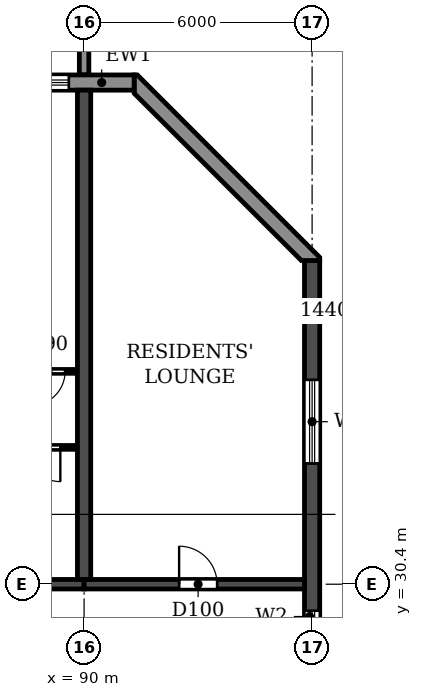
"""IFC4 building model, lengths in metres.
Left out: names, types, materials, properties, quantities, classifications, styles, units other than length and angle.
Written with IfcOpenShell. Run it as: python <this file> out.ifc"""

import sys

from ifc_helpers import new_model, si_unit, direction, frame, frame_2d, origin, place, context, subcontext, project, spatial, polyline, rectangle, outline, extrude, source, transform, mapped, element, fill, save


model = new_model("IFC4")
c1 = context("Model", 3, precision=1e-05, world=origin(), true_north=direction((0.0, 1.0)))
c2 = subcontext(c1, "Body", "Model", "MODEL_VIEW")
j1 = project(units=[si_unit("LENGTHUNIT", "METRE"), si_unit("PLANEANGLEUNIT", "RADIAN")], contexts=[c1])
p1 = place(None, origin())
s1 = spatial("IfcSite", under=j1, at=p1, CompositionType="ELEMENT")
p2 = place(p1, origin())
s2 = spatial("IfcBuilding", under=s1, at=p2, CompositionType="ELEMENT")
p3 = place(p2, frame((0.0, 0.0, 82.8)))
s3 = spatial("IfcBuildingStorey", under=s2, at=p3, CompositionType="ELEMENT", Elevation=82.8)
p4 = place(p3, frame((90.0, 30.525, 0.0), z_axis=(0.0, 0.0, 1.0), x_axis=(0.0, 1.0, 0.0)))
e1 = element("IfcWall", 1, at=p4, inside=s3, PredefinedType="SHEAR", context=c2, shape_type="SweptSolid", body=[
    extrude(rectangle(XDim=12.875, YDim=0.35, at=frame_2d((6.438, 0.0))), origin(), (0.0, 0.0, 1.0), 3.06),
])
p5 = place(p3, frame((96.0, 4.683, 0.0), z_axis=(0.0, 0.0, 1.0), x_axis=(0.0, 1.0, 0.0)))
e2 = element("IfcWall", 2, at=p5, inside=s3, PredefinedType="SHEAR", context=c2, shape_type="SweptSolid", body=[
    extrude(rectangle(XDim=34.234, YDim=0.4, at=frame_2d((17.117, 0.0))), origin(), (0.0, 0.0, 1.0), 3.06),
])
p6 = place(p5, frame((15.917, 0.0, 0.9)))
e3 = element("IfcOpeningElement", 3, at=p6, cuts=e2, PredefinedType="OPENING", context=c2, shape_type="SweptSolid", body=[
    extrude(rectangle(XDim=1.2, YDim=1.5, at=frame_2d((0.6, 0.75))), frame((0.0, 0.21, 0.0), z_axis=(0.0, -1.0, 0.0), x_axis=(1.0, 0.0, 0.0)), (0.0, 0.0, 1.0), 0.42),
])
p7 = place(p5, frame((23.817, 0.0, 0.9)))
e4 = element("IfcOpeningElement", 4, at=p7, cuts=e2, PredefinedType="OPENING", context=c2, shape_type="SweptSolid", body=[
    extrude(rectangle(XDim=1.2, YDim=1.5, at=frame_2d((0.6, 0.75))), frame((0.0, 0.21, 0.0), z_axis=(0.0, -1.0, 0.0), x_axis=(1.0, 0.0, 0.0)), (0.0, 0.0, 1.0), 0.42),
])
p8 = place(p5, frame((8.017, 0.0, 0.9)))
e5 = element("IfcOpeningElement", 5, at=p8, cuts=e2, PredefinedType="OPENING", context=c2, shape_type="SweptSolid", body=[
    extrude(rectangle(XDim=1.2, YDim=1.5, at=frame_2d((0.6, 0.75))), frame((0.0, 0.21, 0.0), z_axis=(0.0, -1.0, 0.0), x_axis=(1.0, 0.0, 0.0)), (0.0, 0.0, 1.0), 0.42),
])
p9 = place(p5, frame((28.894, 0.0, 0.6)))
e6 = element("IfcOpeningElement", 6, at=p9, cuts=e2, PredefinedType="OPENING", context=c2, shape_type="SweptSolid", body=[
    extrude(rectangle(XDim=2.2, YDim=1.8, at=frame_2d((1.1, 0.9))), frame((0.0, 0.21, 0.0), z_axis=(0.0, -1.0, 0.0), x_axis=(1.0, 0.0, 0.0)), (0.0, 0.0, 1.0), 0.42),
])
p10 = place(p5, frame((2.541, 0.0, 0.6)))
e7 = element("IfcOpeningElement", 7, at=p10, cuts=e2, PredefinedType="OPENING", context=c2, shape_type="SweptSolid", body=[
    extrude(rectangle(XDim=2.2, YDim=1.8, at=frame_2d((1.1, 0.9))), frame((0.0, 0.21, 0.0), z_axis=(0.0, -1.0, 0.0), x_axis=(1.0, 0.0, 0.0)), (0.0, 0.0, 1.0), 0.42),
])
p11 = place(p3, frame((84.0, 30.4, 0.0), z_axis=(0.0, 0.0, 1.0), x_axis=(1.0, 0.0, 0.0)))
e8 = element("IfcWall", 8, at=p11, inside=s3, PredefinedType="SHEAR", context=c2, shape_type="SweptSolid", body=[
    extrude(rectangle(XDim=6.0, YDim=0.25, at=frame_2d((3.0, 0.0))), origin(), (0.0, 0.0, 1.0), 2.46),
])
p12 = place(p11, frame((2.45, 0.0, 0.0)))
e9 = element("IfcOpeningElement", 9, at=p12, cuts=e8, PredefinedType="OPENING", context=c2, shape_type="SweptSolid", body=[
    extrude(rectangle(XDim=1.0, YDim=2.1, at=frame_2d((0.5, 1.05))), frame((0.0, 0.135, 0.0), z_axis=(0.0, -1.0, 0.0), x_axis=(1.0, 0.0, 0.0)), (0.0, 0.0, 1.0), 0.27),
])
p13 = place(p3, frame((90.0, 30.4, 0.0), z_axis=(0.0, 0.0, 1.0), x_axis=(1.0, 0.0, 0.0)))
e10 = element("IfcWall", 10, at=p13, inside=s3, PredefinedType="SHEAR", context=c2, shape_type="SweptSolid", body=[
    extrude(rectangle(XDim=5.8, YDim=0.25, at=frame_2d((2.9, 0.0))), origin(), (0.0, 0.0, 1.0), 2.46),
])
p14 = place(p13, frame((2.5, 0.0, 0.0)))
e11 = element("IfcOpeningElement", 11, at=p14, cuts=e10, PredefinedType="OPENING", context=c2, shape_type="SweptSolid", body=[
    extrude(rectangle(XDim=1.0, YDim=2.1, at=frame_2d((0.5, 1.05))), frame((0.0, 0.135, 0.0), z_axis=(0.0, -1.0, 0.0), x_axis=(1.0, 0.0, 0.0)), (0.0, 0.0, 1.0), 0.27),
])
p15 = place(p3, origin())
e12 = element("IfcWall", 12, at=p15, inside=s3, PredefinedType="STANDARD", context=c2, shape_type="SweptSolid", body=[
    extrude(outline(polyline([(96.2, 38.917), (96.2, 39.0), (91.4, 43.8), (91.317, 43.8), (91.317, 43.317), (95.717, 38.917), (96.2, 38.917)])), origin(), (0.0, 0.0, 1.0), 3.06),
])
p16 = place(p3, frame((91.317, 43.6, 0.0), z_axis=(0.0, 0.0, 1.0), x_axis=(-1.0, 0.0, 0.0)))
e13 = element("IfcWall", 13, at=p16, inside=s3, PredefinedType="STANDARD", context=c2, shape_type="SweptSolid", body=[
    extrude(rectangle(XDim=80.634, YDim=0.4, at=frame_2d((40.317, 0.0))), origin(), (0.0, 0.0, 1.0), 3.06),
])
p17 = place(p16, frame((76.717, 0.0, 0.9)))
e14 = element("IfcOpeningElement", 14, at=p17, cuts=e13, PredefinedType="OPENING", context=c2, shape_type="SweptSolid", body=[
    extrude(rectangle(XDim=2.2, YDim=1.5, at=frame_2d((1.1, 0.75))), frame((0.0, 0.21, 0.0), z_axis=(0.0, -1.0, 0.0), x_axis=(1.0, 0.0, 0.0)), (0.0, 0.0, 1.0), 0.42),
])
p18 = place(p16, frame((73.917, 0.0, 0.0)))
e15 = element("IfcOpeningElement", 15, at=p18, cuts=e13, PredefinedType="OPENING", context=c2, shape_type="SweptSolid", body=[
    extrude(rectangle(XDim=1.8, YDim=2.4, at=frame_2d((0.9, 1.2))), frame((0.0, 0.21, 0.0), z_axis=(0.0, -1.0, 0.0), x_axis=(1.0, 0.0, 0.0)), (0.0, 0.0, 1.0), 0.42),
])
p19 = place(p16, frame((70.717, 0.0, 0.9)))
e16 = element("IfcOpeningElement", 16, at=p19, cuts=e13, PredefinedType="OPENING", context=c2, shape_type="SweptSolid", body=[
    extrude(rectangle(XDim=2.2, YDim=1.5, at=frame_2d((1.1, 0.75))), frame((0.0, 0.21, 0.0), z_axis=(0.0, -1.0, 0.0), x_axis=(1.0, 0.0, 0.0)), (0.0, 0.0, 1.0), 0.42),
])
p20 = place(p16, frame((67.717, 0.0, 0.9)))
e17 = element("IfcOpeningElement", 17, at=p20, cuts=e13, PredefinedType="OPENING", context=c2, shape_type="SweptSolid", body=[
    extrude(rectangle(XDim=2.2, YDim=1.5, at=frame_2d((1.1, 0.75))), frame((0.0, 0.21, 0.0), z_axis=(0.0, -1.0, 0.0), x_axis=(1.0, 0.0, 0.0)), (0.0, 0.0, 1.0), 0.42),
])
p21 = place(p16, frame((64.717, 0.0, 0.9)))
e18 = element("IfcOpeningElement", 18, at=p21, cuts=e13, PredefinedType="OPENING", context=c2, shape_type="SweptSolid", body=[
    extrude(rectangle(XDim=2.2, YDim=1.5, at=frame_2d((1.1, 0.75))), frame((0.0, 0.21, 0.0), z_axis=(0.0, -1.0, 0.0), x_axis=(1.0, 0.0, 0.0)), (0.0, 0.0, 1.0), 0.42),
])
p22 = place(p16, frame((61.917, 0.0, 0.0)))
e19 = element("IfcOpeningElement", 19, at=p22, cuts=e13, PredefinedType="OPENING", context=c2, shape_type="SweptSolid", body=[
    extrude(rectangle(XDim=1.8, YDim=2.4, at=frame_2d((0.9, 1.2))), frame((0.0, 0.21, 0.0), z_axis=(0.0, -1.0, 0.0), x_axis=(1.0, 0.0, 0.0)), (0.0, 0.0, 1.0), 0.42),
])
p23 = place(p16, frame((58.917, 0.0, 0.0)))
e20 = element("IfcOpeningElement", 20, at=p23, cuts=e13, PredefinedType="OPENING", context=c2, shape_type="SweptSolid", body=[
    extrude(rectangle(XDim=1.8, YDim=2.4, at=frame_2d((0.9, 1.2))), frame((0.0, 0.21, 0.0), z_axis=(0.0, -1.0, 0.0), x_axis=(1.0, 0.0, 0.0)), (0.0, 0.0, 1.0), 0.42),
])
p24 = place(p16, frame((55.717, 0.0, 0.9)))
e21 = element("IfcOpeningElement", 21, at=p24, cuts=e13, PredefinedType="OPENING", context=c2, shape_type="SweptSolid", body=[
    extrude(rectangle(XDim=2.2, YDim=1.5, at=frame_2d((1.1, 0.75))), frame((0.0, 0.21, 0.0), z_axis=(0.0, -1.0, 0.0), x_axis=(1.0, 0.0, 0.0)), (0.0, 0.0, 1.0), 0.42),
])
p25 = place(p16, frame((52.717, 0.0, 0.9)))
e22 = element("IfcOpeningElement", 22, at=p25, cuts=e13, PredefinedType="OPENING", context=c2, shape_type="SweptSolid", body=[
    extrude(rectangle(XDim=2.2, YDim=1.5, at=frame_2d((1.1, 0.75))), frame((0.0, 0.21, 0.0), z_axis=(0.0, -1.0, 0.0), x_axis=(1.0, 0.0, 0.0)), (0.0, 0.0, 1.0), 0.42),
])
p26 = place(p16, frame((49.917, 0.0, 0.0)))
e23 = element("IfcOpeningElement", 23, at=p26, cuts=e13, PredefinedType="OPENING", context=c2, shape_type="SweptSolid", body=[
    extrude(rectangle(XDim=1.8, YDim=2.4, at=frame_2d((0.9, 1.2))), frame((0.0, 0.21, 0.0), z_axis=(0.0, -1.0, 0.0), x_axis=(1.0, 0.0, 0.0)), (0.0, 0.0, 1.0), 0.42),
])
p27 = place(p16, frame((46.717, 0.0, 0.9)))
e24 = element("IfcOpeningElement", 24, at=p27, cuts=e13, PredefinedType="OPENING", context=c2, shape_type="SweptSolid", body=[
    extrude(rectangle(XDim=2.2, YDim=1.5, at=frame_2d((1.1, 0.75))), frame((0.0, 0.21, 0.0), z_axis=(0.0, -1.0, 0.0), x_axis=(1.0, 0.0, 0.0)), (0.0, 0.0, 1.0), 0.42),
])
p28 = place(p16, frame((43.717, 0.0, 0.9)))
e25 = element("IfcOpeningElement", 25, at=p28, cuts=e13, PredefinedType="OPENING", context=c2, shape_type="SweptSolid", body=[
    extrude(rectangle(XDim=2.2, YDim=1.5, at=frame_2d((1.1, 0.75))), frame((0.0, 0.21, 0.0), z_axis=(0.0, -1.0, 0.0), x_axis=(1.0, 0.0, 0.0)), (0.0, 0.0, 1.0), 0.42),
])
p29 = place(p16, frame((40.717, 0.0, 0.9)))
e26 = element("IfcOpeningElement", 26, at=p29, cuts=e13, PredefinedType="OPENING", context=c2, shape_type="SweptSolid", body=[
    extrude(rectangle(XDim=2.2, YDim=1.5, at=frame_2d((1.1, 0.75))), frame((0.0, 0.21, 0.0), z_axis=(0.0, -1.0, 0.0), x_axis=(1.0, 0.0, 0.0)), (0.0, 0.0, 1.0), 0.42),
])
p30 = place(p16, frame((37.917, 0.0, 0.0)))
e27 = element("IfcOpeningElement", 27, at=p30, cuts=e13, PredefinedType="OPENING", context=c2, shape_type="SweptSolid", body=[
    extrude(rectangle(XDim=1.8, YDim=2.4, at=frame_2d((0.9, 1.2))), frame((0.0, 0.21, 0.0), z_axis=(0.0, -1.0, 0.0), x_axis=(1.0, 0.0, 0.0)), (0.0, 0.0, 1.0), 0.42),
])
p31 = place(p16, frame((34.717, 0.0, 0.9)))
e28 = element("IfcOpeningElement", 28, at=p31, cuts=e13, PredefinedType="OPENING", context=c2, shape_type="SweptSolid", body=[
    extrude(rectangle(XDim=2.2, YDim=1.5, at=frame_2d((1.1, 0.75))), frame((0.0, 0.21, 0.0), z_axis=(0.0, -1.0, 0.0), x_axis=(1.0, 0.0, 0.0)), (0.0, 0.0, 1.0), 0.42),
])
p32 = place(p16, frame((31.717, 0.0, 0.9)))
e29 = element("IfcOpeningElement", 29, at=p32, cuts=e13, PredefinedType="OPENING", context=c2, shape_type="SweptSolid", body=[
    extrude(rectangle(XDim=2.2, YDim=1.5, at=frame_2d((1.1, 0.75))), frame((0.0, 0.21, 0.0), z_axis=(0.0, -1.0, 0.0), x_axis=(1.0, 0.0, 0.0)), (0.0, 0.0, 1.0), 0.42),
])
p33 = place(p16, frame((28.917, 0.0, 0.0)))
e30 = element("IfcOpeningElement", 30, at=p33, cuts=e13, PredefinedType="OPENING", context=c2, shape_type="SweptSolid", body=[
    extrude(rectangle(XDim=1.8, YDim=2.4, at=frame_2d((0.9, 1.2))), frame((0.0, 0.21, 0.0), z_axis=(0.0, -1.0, 0.0), x_axis=(1.0, 0.0, 0.0)), (0.0, 0.0, 1.0), 0.42),
])
p34 = place(p16, frame((25.717, 0.0, 0.9)))
e31 = element("IfcOpeningElement", 31, at=p34, cuts=e13, PredefinedType="OPENING", context=c2, shape_type="SweptSolid", body=[
    extrude(rectangle(XDim=2.2, YDim=1.5, at=frame_2d((1.1, 0.75))), frame((0.0, 0.21, 0.0), z_axis=(0.0, -1.0, 0.0), x_axis=(1.0, 0.0, 0.0)), (0.0, 0.0, 1.0), 0.42),
])
p35 = place(p16, frame((22.717, 0.0, 0.9)))
e32 = element("IfcOpeningElement", 32, at=p35, cuts=e13, PredefinedType="OPENING", context=c2, shape_type="SweptSolid", body=[
    extrude(rectangle(XDim=2.2, YDim=1.5, at=frame_2d((1.1, 0.75))), frame((0.0, 0.21, 0.0), z_axis=(0.0, -1.0, 0.0), x_axis=(1.0, 0.0, 0.0)), (0.0, 0.0, 1.0), 0.42),
])
p36 = place(p16, frame((19.717, 0.0, 0.9)))
e33 = element("IfcOpeningElement", 33, at=p36, cuts=e13, PredefinedType="OPENING", context=c2, shape_type="SweptSolid", body=[
    extrude(rectangle(XDim=2.2, YDim=1.5, at=frame_2d((1.1, 0.75))), frame((0.0, 0.21, 0.0), z_axis=(0.0, -1.0, 0.0), x_axis=(1.0, 0.0, 0.0)), (0.0, 0.0, 1.0), 0.42),
])
p37 = place(p16, frame((16.717, 0.0, 0.9)))
e34 = element("IfcOpeningElement", 34, at=p37, cuts=e13, PredefinedType="OPENING", context=c2, shape_type="SweptSolid", body=[
    extrude(rectangle(XDim=2.2, YDim=1.5, at=frame_2d((1.1, 0.75))), frame((0.0, 0.21, 0.0), z_axis=(0.0, -1.0, 0.0), x_axis=(1.0, 0.0, 0.0)), (0.0, 0.0, 1.0), 0.42),
])
p38 = place(p16, frame((13.917, 0.0, 0.0)))
e35 = element("IfcOpeningElement", 35, at=p38, cuts=e13, PredefinedType="OPENING", context=c2, shape_type="SweptSolid", body=[
    extrude(rectangle(XDim=1.8, YDim=2.4, at=frame_2d((0.9, 1.2))), frame((0.0, 0.21, 0.0), z_axis=(0.0, -1.0, 0.0), x_axis=(1.0, 0.0, 0.0)), (0.0, 0.0, 1.0), 0.42),
])
p39 = place(p16, frame((10.717, 0.0, 0.9)))
e36 = element("IfcOpeningElement", 36, at=p39, cuts=e13, PredefinedType="OPENING", context=c2, shape_type="SweptSolid", body=[
    extrude(rectangle(XDim=2.2, YDim=1.5, at=frame_2d((1.1, 0.75))), frame((0.0, 0.21, 0.0), z_axis=(0.0, -1.0, 0.0), x_axis=(1.0, 0.0, 0.0)), (0.0, 0.0, 1.0), 0.42),
])
p40 = place(p16, frame((7.717, 0.0, 0.9)))
e37 = element("IfcOpeningElement", 37, at=p40, cuts=e13, PredefinedType="OPENING", context=c2, shape_type="SweptSolid", body=[
    extrude(rectangle(XDim=2.2, YDim=1.5, at=frame_2d((1.1, 0.75))), frame((0.0, 0.21, 0.0), z_axis=(0.0, -1.0, 0.0), x_axis=(1.0, 0.0, 0.0)), (0.0, 0.0, 1.0), 0.42),
])
p41 = place(p16, frame((4.917, 0.0, 0.0)))
e38 = element("IfcOpeningElement", 38, at=p41, cuts=e13, PredefinedType="OPENING", context=c2, shape_type="SweptSolid", body=[
    extrude(rectangle(XDim=1.8, YDim=2.4, at=frame_2d((0.9, 1.2))), frame((0.0, 0.21, 0.0), z_axis=(0.0, -1.0, 0.0), x_axis=(1.0, 0.0, 0.0)), (0.0, 0.0, 1.0), 0.42),
])
p42 = place(p16, frame((1.717, 0.0, 0.9)))
e39 = element("IfcOpeningElement", 39, at=p42, cuts=e13, PredefinedType="OPENING", context=c2, shape_type="SweptSolid", body=[
    extrude(rectangle(XDim=2.2, YDim=1.5, at=frame_2d((1.1, 0.75))), frame((0.0, 0.21, 0.0), z_axis=(0.0, -1.0, 0.0), x_axis=(1.0, 0.0, 0.0)), (0.0, 0.0, 1.0), 0.42),
])
m1 = source(origin(), c2, "Body", "SweptSolid", [
    extrude(outline(polyline([(0.0, 0.0), (0.25, 0.0), (0.25, 3.1), (0.0, 3.1), (0.0, 0.0)])), origin(), (0.0, 0.0, 1.0), 3.1),
])
p43 = place(p3, frame((89.875, 43.8, 0.0)))
e40 = element("IfcWall", 40, at=p43, inside=s3, PredefinedType="STANDARD", context=c2, shape_type="MappedRepresentation", body=[
    mapped(m1, transform((0.0, 0.0, 0.0))),
])
p44 = place(p3, frame((87.8, 34.0, 0.0), z_axis=(0.0, 0.0, 1.0), x_axis=(1.0, 0.0, 0.0)))
e41 = element("IfcWall", 41, at=p44, inside=s3, PredefinedType="PARTITIONING", context=c2, shape_type="SweptSolid", body=[
    extrude(rectangle(XDim=2.015, YDim=0.1, at=frame_2d((1.007, 0.0))), origin(), (0.0, 0.0, 1.0), 3.06),
])
p45 = place(p44, frame((0.675, 0.0, 0.0)))
e42 = element("IfcOpeningElement", 42, at=p45, cuts=e41, PredefinedType="OPENING", context=c2, shape_type="SweptSolid", body=[
    extrude(rectangle(XDim=0.9, YDim=2.1, at=frame_2d((0.45, 1.05))), frame((0.0, 0.06, 0.0), z_axis=(0.0, -1.0, 0.0), x_axis=(1.0, 0.0, 0.0)), (0.0, 0.0, 1.0), 0.12),
])
p46 = place(p3, frame((86.95, 36.0, 0.0), z_axis=(0.0, 0.0, 1.0), x_axis=(1.0, 0.0, 0.0)))
e43 = element("IfcWall", 43, at=p46, inside=s3, PredefinedType="PARTITIONING", context=c2, shape_type="SweptSolid", body=[
    extrude(rectangle(XDim=2.865, YDim=0.1, at=frame_2d((1.433, 0.0))), origin(), (0.0, 0.0, 1.0), 3.06),
])
p47 = place(p46, frame((1.65, 0.0, 0.0)))
e44 = element("IfcOpeningElement", 44, at=p47, cuts=e43, PredefinedType="OPENING", context=c2, shape_type="SweptSolid", body=[
    extrude(rectangle(XDim=0.9, YDim=2.1, at=frame_2d((0.45, 1.05))), frame((0.0, 0.06, 0.0), z_axis=(0.0, -1.0, 0.0), x_axis=(1.0, 0.0, 0.0)), (0.0, 0.0, 1.0), 0.12),
])
p48 = place(p7, origin())
e45 = element("IfcWindow", 45, at=p48, inside=s3, PartitioningType="SINGLE_PANEL", PredefinedType="WINDOW", context=c2, shape_type="SweptSolid", body=[
    extrude(rectangle(XDim=1.2, YDim=1.5, at=frame_2d((0.6, 0.75))), frame((0.0, 0.03, 0.0), z_axis=(0.0, -1.0, 0.0), x_axis=(1.0, 0.0, 0.0)), (0.0, 0.0, 1.0), 0.06),
])
fill(e4, e45)
p49 = place(p9, origin())
e46 = element("IfcWindow", 46, at=p49, inside=s3, PartitioningType="DOUBLE_PANEL_HORIZONTAL", PredefinedType="WINDOW", context=c2, shape_type="SweptSolid", body=[
    extrude(rectangle(XDim=2.2, YDim=1.8, at=frame_2d((1.1, 0.9))), frame((0.0, 0.03, 0.0), z_axis=(0.0, -1.0, 0.0), x_axis=(1.0, 0.0, 0.0)), (0.0, 0.0, 1.0), 0.06),
])
fill(e6, e46)
p50 = place(p42, origin())
e47 = element("IfcWindow", 47, at=p50, inside=s3, PartitioningType="DOUBLE_PANEL_HORIZONTAL", PredefinedType="WINDOW", context=c2, shape_type="SweptSolid", body=[
    extrude(rectangle(XDim=2.2, YDim=1.5, at=frame_2d((1.1, 0.75))), frame((0.0, 0.03, 0.0), z_axis=(0.0, -1.0, 0.0), x_axis=(1.0, 0.0, 0.0)), (0.0, 0.0, 1.0), 0.06),
])
fill(e39, e47)
p51 = place(p45, frame((0.9, 0.0, 0.0), z_axis=(0.0, 0.0, 1.0), x_axis=(-1.0, 0.0, 0.0)))
e48 = element("IfcDoor", 48, at=p51, inside=s3, OperationType="SINGLE_SWING_LEFT", PredefinedType="DOOR", context=c2, shape_type="SweptSolid", body=[
    extrude(rectangle(XDim=0.9, YDim=2.1, at=frame_2d((0.45, 1.05))), frame((0.0, 0.025, 0.0), z_axis=(0.0, -1.0, 0.0), x_axis=(1.0, 0.0, 0.0)), (0.0, 0.0, 1.0), 0.05),
])
fill(e42, e48)
p52 = place(p47, frame((0.9, 0.0, 0.0), z_axis=(0.0, 0.0, 1.0), x_axis=(-1.0, 0.0, 0.0)))
e49 = element("IfcDoor", 49, at=p52, inside=s3, OperationType="SINGLE_SWING_RIGHT", PredefinedType="DOOR", context=c2, shape_type="SweptSolid", body=[
    extrude(rectangle(XDim=0.9, YDim=2.1, at=frame_2d((0.45, 1.05))), frame((0.0, 0.025, 0.0), z_axis=(0.0, -1.0, 0.0), x_axis=(1.0, 0.0, 0.0)), (0.0, 0.0, 1.0), 0.05),
])
fill(e44, e49)
p53 = place(p14, origin())
e50 = element("IfcDoor", 50, at=p53, inside=s3, OperationType="SINGLE_SWING_LEFT", PredefinedType="DOOR", context=c2, shape_type="SweptSolid", body=[
    extrude(rectangle(XDim=1.0, YDim=2.1, at=frame_2d((0.5, 1.05))), frame((0.0, 0.025, 0.0), z_axis=(0.0, -1.0, 0.0), x_axis=(1.0, 0.0, 0.0)), (0.0, 0.0, 1.0), 0.05),
])
fill(e11, e50)
save(model, sys.argv[1])
